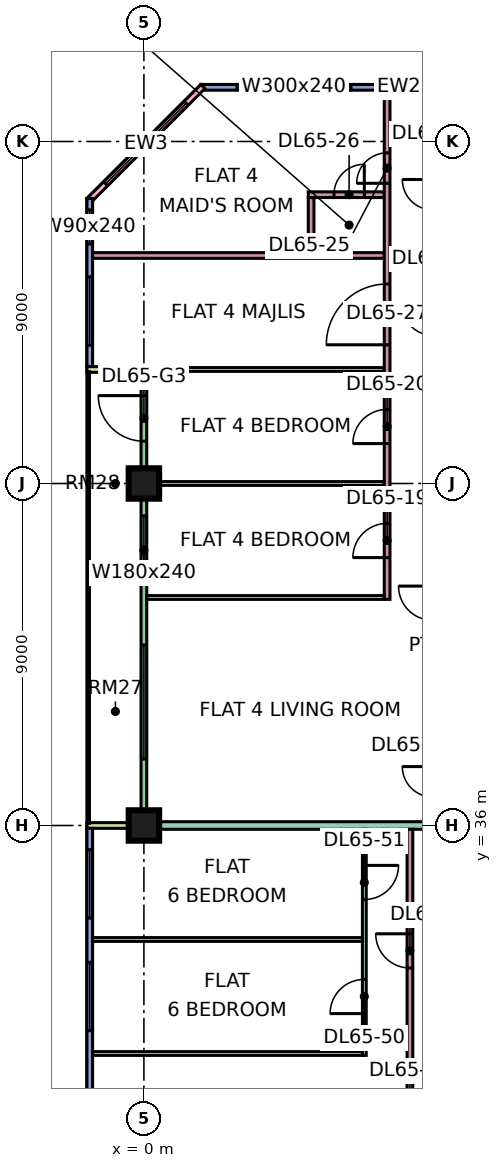
"""IFC4 building model, lengths in metres.
Left out: names, types, materials, properties, quantities, classifications, styles, units other than length and angle.
Written with IfcOpenShell. Run it as: python <this file> out.ifc"""

import sys

from ifc_helpers import new_model, si_unit, direction, frame, frame_2d, origin, origin_2d, place, context, subcontext, project, spatial, rectangle, extrude, element, fill, save


model = new_model("IFC4")
c1 = context("Model", 3, precision=1e-05, world=origin(), true_north=direction((0.0, 1.0)))
c2 = subcontext(c1, "Body", "Model", "MODEL_VIEW")
j1 = project(units=[si_unit("LENGTHUNIT", "METRE"), si_unit("PLANEANGLEUNIT", "RADIAN")], contexts=[c1])
p1 = place(None, origin())
s1 = spatial("IfcSite", under=j1, at=p1, CompositionType="ELEMENT")
p2 = place(p1, origin())
s2 = spatial("IfcBuilding", under=s1, at=p2, CompositionType="ELEMENT")
p3 = place(p2, frame((0.0, 0.0, 280.9)))
s3 = spatial("IfcBuildingStorey", under=s2, at=p3, CompositionType="ELEMENT", Elevation=280.9)
p4 = place(p3, frame((0.0, 36.0, 0.0), z_axis=(0.0, 0.0, 1.0), x_axis=(1.0, 0.0, 0.0)))
e1 = element("IfcColumn", 1, at=p4, inside=s3, PredefinedType="COLUMN", context=c2, shape_type="SweptSolid", body=[
    extrude(rectangle(XDim=0.8, YDim=0.8, at=origin_2d()), origin(), (0.0, 0.0, 1.0), 3.75),
])
p5 = place(p3, frame((0.0, 45.0, 0.0), z_axis=(0.0, 0.0, 1.0), x_axis=(1.0, 0.0, 0.0)))
e2 = element("IfcColumn", 2, at=p5, inside=s3, PredefinedType="COLUMN", context=c2, shape_type="SweptSolid", body=[
    extrude(rectangle(XDim=0.8, YDim=0.8, at=origin_2d()), origin(), (0.0, 0.0, 1.0), 3.75),
])
p6 = place(p3, frame((11.925, 55.425, 0.0), z_axis=(0.0, 0.0, 1.0), x_axis=(-1.0, 0.0, 0.0)))
e3 = element("IfcWall", 3, at=p6, inside=s3, PredefinedType="SOLIDWALL", context=c2, shape_type="SweptSolid", body=[
    extrude(rectangle(XDim=10.425, YDim=0.15, at=frame_2d((5.212, 0.0))), origin(), (0.0, 0.0, 1.0), 3.35),
])
p7 = place(p6, frame((1.562, 0.0, 1.7)))
e4 = element("IfcOpeningElement", 4, at=p7, cuts=e3, PredefinedType="OPENING", context=c2, shape_type="SweptSolid", body=[
    extrude(rectangle(XDim=1.2, YDim=0.9, at=frame_2d((0.6, 0.45))), frame((0.0, 0.085, 0.0), z_axis=(0.0, -1.0, 0.0), x_axis=(1.0, 0.0, 0.0)), (0.0, 0.0, 1.0), 0.17),
])
p8 = place(p6, frame((6.475, 0.0, 0.45)))
e5 = element("IfcOpeningElement", 5, at=p8, cuts=e3, PredefinedType="OPENING", context=c2, shape_type="SweptSolid", body=[
    extrude(rectangle(XDim=3.0, YDim=2.4, at=frame_2d((1.5, 1.2))), frame((0.0, 0.085, 0.0), z_axis=(0.0, -1.0, 0.0), x_axis=(1.0, 0.0, 0.0)), (0.0, 0.0, 1.0), 0.17),
])
p9 = place(p3, frame((1.553, 55.447, 0.0), z_axis=(0.0, 0.0, 1.0), x_axis=(-0.707106781187, -0.707106781187, 0.0)))
e6 = element("IfcWall", 6, at=p9, inside=s3, PredefinedType="SOLIDWALL", context=c2, shape_type="SweptSolid", body=[
    extrude(rectangle(XDim=4.243, YDim=0.15, at=frame_2d((2.121, 0.0))), origin(), (0.0, 0.0, 1.0), 3.35),
])
p10 = place(p9, frame((0.621, 0.0, 0.45)))
e7 = element("IfcOpeningElement", 7, at=p10, cuts=e6, PredefinedType="OPENING", context=c2, shape_type="SweptSolid", body=[
    extrude(rectangle(XDim=3.0, YDim=2.4, at=frame_2d((1.5, 1.2))), frame((0.0, 0.085, 0.0), z_axis=(0.0, -1.0, 0.0), x_axis=(1.0, 0.0, 0.0)), (0.0, 0.0, 1.0), 0.17),
])
p11 = place(p3, frame((-1.425, 52.5, 0.0), z_axis=(0.0, 0.0, 1.0), x_axis=(0.0, -1.0, 0.0)))
e8 = element("IfcWall", 8, at=p11, inside=s3, PredefinedType="SOLIDWALL", context=c2, shape_type="SweptSolid", body=[
    extrude(rectangle(XDim=4.425, YDim=0.15, at=frame_2d((2.212, 0.0))), origin(), (0.0, 0.0, 1.0), 3.35),
])
p12 = place(p11, frame((0.3, 0.0, 0.45)))
e9 = element("IfcOpeningElement", 9, at=p12, cuts=e8, PredefinedType="OPENING", context=c2, shape_type="SweptSolid", body=[
    extrude(rectangle(XDim=0.9, YDim=2.4, at=frame_2d((0.45, 1.2))), frame((0.0, 0.085, 0.0), z_axis=(0.0, -1.0, 0.0), x_axis=(1.0, 0.0, 0.0)), (0.0, 0.0, 1.0), 0.17),
])
p13 = place(p11, frame((2.062, 0.0, 0.45)))
e10 = element("IfcOpeningElement", 10, at=p13, cuts=e8, PredefinedType="OPENING", context=c2, shape_type="SweptSolid", body=[
    extrude(rectangle(XDim=1.8, YDim=2.4, at=frame_2d((0.9, 1.2))), frame((0.0, 0.085, 0.0), z_axis=(0.0, -1.0, 0.0), x_axis=(1.0, 0.0, 0.0)), (0.0, 0.0, 1.0), 0.17),
])
p14 = place(p3, frame((0.0, 47.925, 0.0), z_axis=(0.0, 0.0, 1.0), x_axis=(0.0, -1.0, 0.0)))
e11 = element("IfcWall", 11, at=p14, inside=s3, PredefinedType="SOLIDWALL", context=c2, shape_type="SweptSolid", body=[
    extrude(rectangle(XDim=11.85, YDim=0.15, at=frame_2d((5.925, 0.0))), origin(), (0.0, 0.0, 1.0), 3.35),
])
p15 = place(p14, frame((0.613, 0.0, 0.0)))
e12 = element("IfcOpeningElement", 12, at=p15, cuts=e11, PredefinedType="OPENING", context=c2, shape_type="SweptSolid", body=[
    extrude(rectangle(XDim=1.2, YDim=2.4, at=frame_2d((0.6, 1.2))), frame((0.0, 0.085, 0.0), z_axis=(0.0, -1.0, 0.0), x_axis=(1.0, 0.0, 0.0)), (0.0, 0.0, 1.0), 0.17),
])
p16 = place(p14, frame((3.775, 0.0, 0.45)))
e13 = element("IfcOpeningElement", 13, at=p16, cuts=e11, PredefinedType="OPENING", context=c2, shape_type="SweptSolid", body=[
    extrude(rectangle(XDim=1.8, YDim=2.4, at=frame_2d((0.9, 1.2))), frame((0.0, 0.085, 0.0), z_axis=(0.0, -1.0, 0.0), x_axis=(1.0, 0.0, 0.0)), (0.0, 0.0, 1.0), 0.17),
])
p17 = place(p14, frame((7.175, 0.0, 0.45)))
e14 = element("IfcOpeningElement", 14, at=p17, cuts=e11, PredefinedType="OPENING", context=c2, shape_type="SweptSolid", body=[
    extrude(rectangle(XDim=3.0, YDim=2.4, at=frame_2d((1.5, 1.2))), frame((0.0, 0.085, 0.0), z_axis=(0.0, -1.0, 0.0), x_axis=(1.0, 0.0, 0.0)), (0.0, 0.0, 1.0), 0.17),
])
for number, where, z_axis, x_axis in (
    (15, (-1.5, 48.0, 0.0), (0.0, 0.0, 1.0), (1.0, 0.0, 0.0)),
    (16, (-1.5, 36.0, 0.0), (0.0, 0.0, 1.0), (1.0, 0.0, 0.0)),
):
    element("IfcWall", number, at=place(p3, frame(where, z_axis=z_axis, x_axis=x_axis)), inside=s3, PredefinedType="SOLIDWALL", context=c2, shape_type="SweptSolid", body=[
        extrude(rectangle(XDim=1.5, YDim=0.15, at=frame_2d((0.75, 0.0))), origin(), (0.0, 0.0, 1.0), 3.35),
    ])
p18 = place(p3, frame((-1.425, 35.925, 0.0), z_axis=(0.0, 0.0, 1.0), x_axis=(0.0, -1.0, 0.0)))
e17 = element("IfcWall", 17, at=p18, inside=s3, PredefinedType="SOLIDWALL", context=c2, shape_type="SweptSolid", body=[
    extrude(rectangle(XDim=11.85, YDim=0.15, at=frame_2d((5.925, 0.0))), origin(), (0.0, 0.0, 1.0), 3.35),
])
p19 = place(p18, frame((0.562, 0.0, 0.45)))
e18 = element("IfcOpeningElement", 18, at=p19, cuts=e17, PredefinedType="OPENING", context=c2, shape_type="SweptSolid", body=[
    extrude(rectangle(XDim=1.8, YDim=2.4, at=frame_2d((0.9, 1.2))), frame((0.0, 0.085, 0.0), z_axis=(0.0, -1.0, 0.0), x_axis=(1.0, 0.0, 0.0)), (0.0, 0.0, 1.0), 0.17),
])
p20 = place(p18, frame((3.525, 0.0, 0.45)))
e19 = element("IfcOpeningElement", 19, at=p20, cuts=e17, PredefinedType="OPENING", context=c2, shape_type="SweptSolid", body=[
    extrude(rectangle(XDim=1.8, YDim=2.4, at=frame_2d((0.9, 1.2))), frame((0.0, 0.085, 0.0), z_axis=(0.0, -1.0, 0.0), x_axis=(1.0, 0.0, 0.0)), (0.0, 0.0, 1.0), 0.17),
])
p21 = place(p18, frame((7.387, 0.0, 0.45)))
e20 = element("IfcOpeningElement", 20, at=p21, cuts=e17, PredefinedType="OPENING", context=c2, shape_type="SweptSolid", body=[
    extrude(rectangle(XDim=3.0, YDim=2.4, at=frame_2d((1.5, 1.2))), frame((0.0, 0.085, 0.0), z_axis=(0.0, -1.0, 0.0), x_axis=(1.0, 0.0, 0.0)), (0.0, 0.0, 1.0), 0.17),
])
p22 = place(p3, frame((-1.351, 33.0, 0.0), z_axis=(0.0, 0.0, 1.0), x_axis=(1.0, 0.0, 0.0)))
e21 = element("IfcWall", 21, at=p22, inside=s3, PredefinedType="PARTITIONING", context=c2, shape_type="SweptSolid", body=[
    extrude(rectangle(XDim=7.101, YDim=0.1, at=frame_2d((3.551, 0.0))), origin(), (0.0, 0.0, 1.0), 3.35),
])
p23 = place(p3, frame((-1.351, 51.0, 0.0), z_axis=(0.0, 0.0, 1.0), x_axis=(1.0, 0.0, 0.0)))
e22 = element("IfcWall", 22, at=p23, inside=s3, PredefinedType="PARTITIONING", context=c2, shape_type="SweptSolid", body=[
    extrude(rectangle(XDim=7.676, YDim=0.15, at=frame_2d((3.838, 0.0))), origin(), (0.0, 0.0, 1.0), 3.35),
])
p24 = place(p3, frame((-1.35, 30.0, 0.0), z_axis=(0.0, 0.0, 1.0), x_axis=(1.0, 0.0, 0.0)))
e23 = element("IfcWall", 23, at=p24, inside=s3, PredefinedType="PARTITIONING", context=c2, shape_type="SweptSolid", body=[
    extrude(rectangle(XDim=7.1, YDim=0.1, at=frame_2d((3.55, 0.0))), origin(), (0.0, 0.0, 1.0), 3.35),
])
e24 = element("IfcWall", 24, at=p4, inside=s3, PredefinedType="PARTITIONING", context=c2, shape_type="SweptSolid", body=[
    extrude(rectangle(XDim=12.3, YDim=0.2, at=frame_2d((6.15, 0.0))), origin(), (0.0, 0.0, 1.0), 3.35),
])
p25 = place(p3, frame((0.0, 48.0, 0.0), z_axis=(0.0, 0.0, 1.0), x_axis=(1.0, 0.0, 0.0)))
e25 = element("IfcWall", 25, at=p25, inside=s3, PredefinedType="PARTITIONING", context=c2, shape_type="SweptSolid", body=[
    extrude(rectangle(XDim=6.325, YDim=0.1, at=frame_2d((3.163, 0.0))), origin(), (0.0, 0.0, 1.0), 3.35),
])
for number, where, z_axis, x_axis in (
    (26, (0.074, 42.0, 0.0), (0.0, 0.0, 1.0), (1.0, 0.0, 0.0)),
    (27, (0.074, 45.0, 0.0), (0.0, 0.0, 1.0), (1.0, 0.0, 0.0)),
):
    element("IfcWall", number, at=place(p3, frame(where, z_axis=z_axis, x_axis=x_axis)), inside=s3, PredefinedType="PARTITIONING", context=c2, shape_type="SweptSolid", body=[
        extrude(rectangle(XDim=6.251, YDim=0.1, at=frame_2d((3.125, 0.0))), origin(), (0.0, 0.0, 1.0), 3.35),
    ])
p26 = place(p3, frame((4.325, 52.6, 0.0), z_axis=(0.0, 0.0, 1.0), x_axis=(1.0, 0.0, 0.0)))
e28 = element("IfcWall", 28, at=p26, inside=s3, PredefinedType="PARTITIONING", context=c2, shape_type="SweptSolid", body=[
    extrude(rectangle(XDim=2.0, YDim=0.15, at=frame_2d((1.0, 0.0))), origin(), (0.0, 0.0, 1.0), 3.35),
])
p27 = place(p26, frame((0.675, 0.0, 0.0)))
e29 = element("IfcOpeningElement", 29, at=p27, cuts=e28, PredefinedType="OPENING", context=c2, shape_type="SweptSolid", body=[
    extrude(rectangle(XDim=0.8, YDim=2.1, at=frame_2d((0.4, 1.05))), frame((0.0, 0.085, 0.0), z_axis=(0.0, -1.0, 0.0), x_axis=(1.0, 0.0, 0.0)), (0.0, 0.0, 1.0), 0.17),
])
p28 = place(p3, frame((4.4, 51.075, 0.0), z_axis=(0.0, 0.0, 1.0), x_axis=(0.0, 1.0, 0.0)))
e30 = element("IfcWall", 30, at=p28, inside=s3, PredefinedType="PARTITIONING", context=c2, shape_type="SweptSolid", body=[
    extrude(rectangle(XDim=1.45, YDim=0.15, at=frame_2d((0.725, 0.0))), origin(), (0.0, 0.0, 1.0), 3.35),
])
p29 = place(p3, frame((5.8, 29.95, 0.0), z_axis=(0.0, 0.0, 1.0), x_axis=(0.0, 1.0, 0.0)))
e31 = element("IfcWall", 31, at=p29, inside=s3, PredefinedType="PARTITIONING", context=c2, shape_type="SweptSolid", body=[
    extrude(rectangle(XDim=5.95, YDim=0.1, at=frame_2d((2.975, 0.0))), origin(), (0.0, 0.0, 1.0), 3.35),
])
p30 = place(p29, frame((1.1, 0.0, 0.0)))
e32 = element("IfcOpeningElement", 32, at=p30, cuts=e31, PredefinedType="OPENING", context=c2, shape_type="SweptSolid", body=[
    extrude(rectangle(XDim=0.9, YDim=2.1, at=frame_2d((0.45, 1.05))), frame((0.0, 0.06, 0.0), z_axis=(0.0, -1.0, 0.0), x_axis=(1.0, 0.0, 0.0)), (0.0, 0.0, 1.0), 0.12),
])
p31 = place(p29, frame((4.1, 0.0, 0.0)))
e33 = element("IfcOpeningElement", 33, at=p31, cuts=e31, PredefinedType="OPENING", context=c2, shape_type="SweptSolid", body=[
    extrude(rectangle(XDim=0.9, YDim=2.1, at=frame_2d((0.45, 1.05))), frame((0.0, 0.06, 0.0), z_axis=(0.0, -1.0, 0.0), x_axis=(1.0, 0.0, 0.0)), (0.0, 0.0, 1.0), 0.12),
])
p32 = place(p3, frame((6.4, 41.95, 0.0), z_axis=(0.0, 0.0, 1.0), x_axis=(0.0, 1.0, 0.0)))
e34 = element("IfcWall", 34, at=p32, inside=s3, PredefinedType="PARTITIONING", context=c2, shape_type="SweptSolid", body=[
    extrude(rectangle(XDim=13.4, YDim=0.15, at=frame_2d((6.7, 0.0))), origin(), (0.0, 0.0, 1.0), 3.35),
])
p33 = place(p32, frame((1.1, 0.0, 0.0)))
e35 = element("IfcOpeningElement", 35, at=p33, cuts=e34, PredefinedType="OPENING", context=c2, shape_type="SweptSolid", body=[
    extrude(rectangle(XDim=0.9, YDim=2.1, at=frame_2d((0.45, 1.05))), frame((0.0, 0.085, 0.0), z_axis=(0.0, -1.0, 0.0), x_axis=(1.0, 0.0, 0.0)), (0.0, 0.0, 1.0), 0.17),
])
p34 = place(p32, frame((4.1, 0.0, 0.0)))
e36 = element("IfcOpeningElement", 36, at=p34, cuts=e34, PredefinedType="OPENING", context=c2, shape_type="SweptSolid", body=[
    extrude(rectangle(XDim=0.9, YDim=2.1, at=frame_2d((0.45, 1.05))), frame((0.0, 0.085, 0.0), z_axis=(0.0, -1.0, 0.0), x_axis=(1.0, 0.0, 0.0)), (0.0, 0.0, 1.0), 0.17),
])
p35 = place(p32, frame((10.95, 0.0, 0.0)))
e37 = element("IfcOpeningElement", 37, at=p35, cuts=e34, PredefinedType="OPENING", context=c2, shape_type="SweptSolid", body=[
    extrude(rectangle(XDim=0.8, YDim=2.1, at=frame_2d((0.4, 1.05))), frame((0.0, 0.085, 0.0), z_axis=(0.0, -1.0, 0.0), x_axis=(1.0, 0.0, 0.0)), (0.0, 0.0, 1.0), 0.17),
])
p36 = place(p32, frame((6.7, 0.0, 0.0)))
e38 = element("IfcOpeningElement", 38, at=p36, cuts=e34, PredefinedType="OPENING", context=c2, shape_type="SweptSolid", body=[
    extrude(rectangle(XDim=1.6, YDim=2.1, at=frame_2d((0.8, 1.05))), frame((0.0, 0.085, 0.0), z_axis=(0.0, -1.0, 0.0), x_axis=(1.0, 0.0, 0.0)), (0.0, 0.0, 1.0), 0.17),
])
p37 = place(p3, frame((7.0, 27.525, 0.0), z_axis=(0.0, 0.0, 1.0), x_axis=(0.0, 1.0, 0.0)))
e39 = element("IfcWall", 39, at=p37, inside=s3, PredefinedType="PARTITIONING", context=c2, shape_type="SweptSolid", body=[
    extrude(rectangle(XDim=8.375, YDim=0.15, at=frame_2d((4.188, 0.0))), origin(), (0.0, 0.0, 1.0), 3.35),
])
p38 = place(p37, frame((0.525, 0.0, 0.0)))
e40 = element("IfcOpeningElement", 40, at=p38, cuts=e39, PredefinedType="OPENING", context=c2, shape_type="SweptSolid", body=[
    extrude(rectangle(XDim=0.8, YDim=2.1, at=frame_2d((0.4, 1.05))), frame((0.0, 0.085, 0.0), z_axis=(0.0, -1.0, 0.0), x_axis=(1.0, 0.0, 0.0)), (0.0, 0.0, 1.0), 0.17),
])
p39 = place(p37, frame((4.725, 0.0, 0.0)))
e41 = element("IfcOpeningElement", 41, at=p39, cuts=e39, PredefinedType="OPENING", context=c2, shape_type="SweptSolid", body=[
    extrude(rectangle(XDim=0.9, YDim=2.1, at=frame_2d((0.45, 1.05))), frame((0.0, 0.085, 0.0), z_axis=(0.0, -1.0, 0.0), x_axis=(1.0, 0.0, 0.0)), (0.0, 0.0, 1.0), 0.17),
])
p40 = place(p3, frame((7.075, 29.4, 0.0), z_axis=(0.0, 0.0, 1.0), x_axis=(1.0, 0.0, 0.0)))
e42 = element("IfcWall", 42, at=p40, inside=s3, PredefinedType="PARTITIONING", context=c2, shape_type="SweptSolid", body=[
    extrude(rectangle(XDim=5.225, YDim=0.15, at=frame_2d((2.613, 0.0))), origin(), (0.0, 0.0, 1.0), 3.35),
])
p41 = place(p8, origin())
e43 = element("IfcWindow", 43, at=p41, inside=s3, PartitioningType="SINGLE_PANEL", PredefinedType="WINDOW", context=c2, shape_type="SweptSolid", body=[
    extrude(rectangle(XDim=3.0, YDim=2.4, at=frame_2d((1.5, 1.2))), frame((0.0, 0.03, 0.0), z_axis=(0.0, -1.0, 0.0), x_axis=(1.0, 0.0, 0.0)), (0.0, 0.0, 1.0), 0.06),
])
fill(e5, e43)
p42 = place(p10, origin())
e44 = element("IfcWindow", 44, at=p42, inside=s3, PartitioningType="SINGLE_PANEL", PredefinedType="WINDOW", context=c2, shape_type="SweptSolid", body=[
    extrude(rectangle(XDim=3.0, YDim=2.4, at=frame_2d((1.5, 1.2))), frame((0.0, 0.03, 0.0), z_axis=(0.0, -1.0, 0.0), x_axis=(1.0, 0.0, 0.0)), (0.0, 0.0, 1.0), 0.06),
])
fill(e7, e44)
p43 = place(p12, origin())
e45 = element("IfcWindow", 45, at=p43, inside=s3, PartitioningType="SINGLE_PANEL", PredefinedType="WINDOW", context=c2, shape_type="SweptSolid", body=[
    extrude(rectangle(XDim=0.9, YDim=2.4, at=frame_2d((0.45, 1.2))), frame((0.0, 0.03, 0.0), z_axis=(0.0, -1.0, 0.0), x_axis=(1.0, 0.0, 0.0)), (0.0, 0.0, 1.0), 0.06),
])
fill(e9, e45)
p44 = place(p13, origin())
e46 = element("IfcWindow", 46, at=p44, inside=s3, PartitioningType="SINGLE_PANEL", PredefinedType="WINDOW", context=c2, shape_type="SweptSolid", body=[
    extrude(rectangle(XDim=1.8, YDim=2.4, at=frame_2d((0.9, 1.2))), frame((0.0, 0.03, 0.0), z_axis=(0.0, -1.0, 0.0), x_axis=(1.0, 0.0, 0.0)), (0.0, 0.0, 1.0), 0.06),
])
fill(e10, e46)
p45 = place(p15, frame((1.2, 0.0, 0.0), z_axis=(0.0, 0.0, 1.0), x_axis=(-1.0, 0.0, 0.0)))
e47 = element("IfcDoor", 47, at=p45, inside=s3, OperationType="DOUBLE_DOOR_SINGLE_SWING", PredefinedType="DOOR", context=c2, shape_type="SweptSolid", body=[
    extrude(rectangle(XDim=1.2, YDim=2.4, at=frame_2d((0.6, 1.2))), frame((0.0, 0.025, 0.0), z_axis=(0.0, -1.0, 0.0), x_axis=(1.0, 0.0, 0.0)), (0.0, 0.0, 1.0), 0.05),
])
fill(e12, e47)
p46 = place(p16, origin())
e48 = element("IfcWindow", 48, at=p46, inside=s3, PartitioningType="SINGLE_PANEL", PredefinedType="WINDOW", context=c2, shape_type="SweptSolid", body=[
    extrude(rectangle(XDim=1.8, YDim=2.4, at=frame_2d((0.9, 1.2))), frame((0.0, 0.03, 0.0), z_axis=(0.0, -1.0, 0.0), x_axis=(1.0, 0.0, 0.0)), (0.0, 0.0, 1.0), 0.06),
])
fill(e13, e48)
p47 = place(p17, origin())
e49 = element("IfcWindow", 49, at=p47, inside=s3, PartitioningType="SINGLE_PANEL", PredefinedType="WINDOW", context=c2, shape_type="SweptSolid", body=[
    extrude(rectangle(XDim=3.0, YDim=2.4, at=frame_2d((1.5, 1.2))), frame((0.0, 0.03, 0.0), z_axis=(0.0, -1.0, 0.0), x_axis=(1.0, 0.0, 0.0)), (0.0, 0.0, 1.0), 0.06),
])
fill(e14, e49)
p48 = place(p19, origin())
e50 = element("IfcWindow", 50, at=p48, inside=s3, PartitioningType="SINGLE_PANEL", PredefinedType="WINDOW", context=c2, shape_type="SweptSolid", body=[
    extrude(rectangle(XDim=1.8, YDim=2.4, at=frame_2d((0.9, 1.2))), frame((0.0, 0.03, 0.0), z_axis=(0.0, -1.0, 0.0), x_axis=(1.0, 0.0, 0.0)), (0.0, 0.0, 1.0), 0.06),
])
fill(e18, e50)
p49 = place(p20, origin())
e51 = element("IfcWindow", 51, at=p49, inside=s3, PartitioningType="SINGLE_PANEL", PredefinedType="WINDOW", context=c2, shape_type="SweptSolid", body=[
    extrude(rectangle(XDim=1.8, YDim=2.4, at=frame_2d((0.9, 1.2))), frame((0.0, 0.03, 0.0), z_axis=(0.0, -1.0, 0.0), x_axis=(1.0, 0.0, 0.0)), (0.0, 0.0, 1.0), 0.06),
])
fill(e19, e51)
p50 = place(p33, origin())
e52 = element("IfcDoor", 52, at=p50, inside=s3, OperationType="SINGLE_SWING_LEFT", PredefinedType="DOOR", context=c2, shape_type="SweptSolid", body=[
    extrude(rectangle(XDim=0.9, YDim=2.1, at=frame_2d((0.45, 1.05))), frame((0.0, 0.025, 0.0), z_axis=(0.0, -1.0, 0.0), x_axis=(1.0, 0.0, 0.0)), (0.0, 0.0, 1.0), 0.05),
])
fill(e35, e52)
p51 = place(p34, origin())
e53 = element("IfcDoor", 53, at=p51, inside=s3, OperationType="SINGLE_SWING_LEFT", PredefinedType="DOOR", context=c2, shape_type="SweptSolid", body=[
    extrude(rectangle(XDim=0.9, YDim=2.1, at=frame_2d((0.45, 1.05))), frame((0.0, 0.025, 0.0), z_axis=(0.0, -1.0, 0.0), x_axis=(1.0, 0.0, 0.0)), (0.0, 0.0, 1.0), 0.05),
])
fill(e36, e53)
p52 = place(p35, origin())
e54 = element("IfcDoor", 54, at=p52, inside=s3, OperationType="SINGLE_SWING_LEFT", PredefinedType="DOOR", context=c2, shape_type="SweptSolid", body=[
    extrude(rectangle(XDim=0.8, YDim=2.1, at=frame_2d((0.4, 1.05))), frame((0.0, 0.025, 0.0), z_axis=(0.0, -1.0, 0.0), x_axis=(1.0, 0.0, 0.0)), (0.0, 0.0, 1.0), 0.05),
])
fill(e37, e54)
p53 = place(p27, frame((0.8, 0.0, 0.0), z_axis=(0.0, 0.0, 1.0), x_axis=(-1.0, 0.0, 0.0)))
e55 = element("IfcDoor", 55, at=p53, inside=s3, OperationType="SINGLE_SWING_RIGHT", PredefinedType="DOOR", context=c2, shape_type="SweptSolid", body=[
    extrude(rectangle(XDim=0.8, YDim=2.1, at=frame_2d((0.4, 1.05))), frame((0.0, 0.025, 0.0), z_axis=(0.0, -1.0, 0.0), x_axis=(1.0, 0.0, 0.0)), (0.0, 0.0, 1.0), 0.05),
])
fill(e29, e55)
p54 = place(p36, origin())
e56 = element("IfcDoor", 56, at=p54, inside=s3, OperationType="DOUBLE_DOOR_SINGLE_SWING", PredefinedType="DOOR", context=c2, shape_type="SweptSolid", body=[
    extrude(rectangle(XDim=1.6, YDim=2.1, at=frame_2d((0.8, 1.05))), frame((0.0, 0.025, 0.0), z_axis=(0.0, -1.0, 0.0), x_axis=(1.0, 0.0, 0.0)), (0.0, 0.0, 1.0), 0.05),
])
fill(e38, e56)
p55 = place(p30, origin())
e57 = element("IfcDoor", 57, at=p55, inside=s3, OperationType="SINGLE_SWING_LEFT", PredefinedType="DOOR", context=c2, shape_type="SweptSolid", body=[
    extrude(rectangle(XDim=0.9, YDim=2.1, at=frame_2d((0.45, 1.05))), frame((0.0, 0.025, 0.0), z_axis=(0.0, -1.0, 0.0), x_axis=(1.0, 0.0, 0.0)), (0.0, 0.0, 1.0), 0.05),
])
fill(e32, e57)
p56 = place(p31, origin())
e58 = element("IfcDoor", 58, at=p56, inside=s3, OperationType="SINGLE_SWING_RIGHT", PredefinedType="DOOR", context=c2, shape_type="SweptSolid", body=[
    extrude(rectangle(XDim=0.9, YDim=2.1, at=frame_2d((0.45, 1.05))), frame((0.0, 0.025, 0.0), z_axis=(0.0, -1.0, 0.0), x_axis=(1.0, 0.0, 0.0)), (0.0, 0.0, 1.0), 0.05),
])
fill(e33, e58)
p57 = place(p39, frame((0.9, 0.0, 0.0), z_axis=(0.0, 0.0, 1.0), x_axis=(-1.0, 0.0, 0.0)))
e59 = element("IfcDoor", 59, at=p57, inside=s3, OperationType="SINGLE_SWING_RIGHT", PredefinedType="DOOR", context=c2, shape_type="SweptSolid", body=[
    extrude(rectangle(XDim=0.9, YDim=2.1, at=frame_2d((0.45, 1.05))), frame((0.0, 0.025, 0.0), z_axis=(0.0, -1.0, 0.0), x_axis=(1.0, 0.0, 0.0)), (0.0, 0.0, 1.0), 0.05),
])
fill(e41, e59)
save(model, sys.argv[1])
